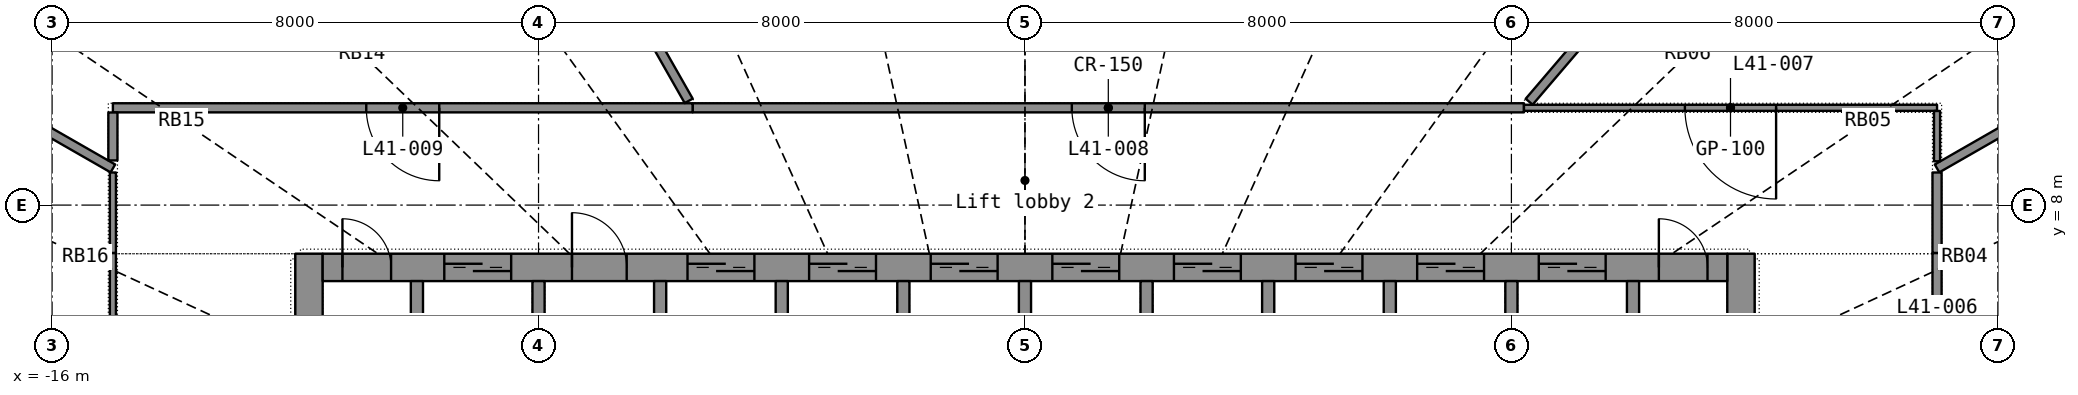
"""IFC4 building model, lengths in metres.
Left out: names, types, materials, properties, quantities, classifications, styles, units other than length and angle.
Written with IfcOpenShell. Run it as: python <this file> out.ifc"""

import sys

from ifc_helpers import new_model, si_unit, direction, frame, frame_2d, origin, place, context, subcontext, project, spatial, rectangle, extrude, element, fill, save


model = new_model("IFC4")
c1 = context("Model", 3, precision=1e-05, world=origin(), true_north=direction((0.0, 1.0)))
c2 = subcontext(c1, "Body", "Model", "MODEL_VIEW")
j1 = project(units=[si_unit("LENGTHUNIT", "METRE"), si_unit("PLANEANGLEUNIT", "RADIAN")], contexts=[c1])
p1 = place(None, origin())
s1 = spatial("IfcSite", under=j1, at=p1, CompositionType="ELEMENT")
p2 = place(p1, origin())
s2 = spatial("IfcBuilding", under=s1, at=p2, CompositionType="ELEMENT")
p3 = place(p2, frame((0.0, 0.0, 171.9)))
s3 = spatial("IfcBuildingStorey", under=s2, at=p3, CompositionType="ELEMENT", Elevation=171.9)
p4 = place(p3, frame((-11.775, -7.2, 0.0), z_axis=(0.0, 0.0, 1.0), x_axis=(0.0, 1.0, 0.0)))
e1 = element("IfcWall", 1, at=p4, inside=s3, PredefinedType="SHEAR", context=c2, shape_type="SweptSolid", body=[
    extrude(rectangle(XDim=14.4, YDim=0.45, at=frame_2d((7.2, 0.0))), origin(), (0.0, 0.0, 1.0), 3.3),
])
p5 = place(p4, frame((6.5, 0.0, 0.0)))
e2 = element("IfcOpeningElement", 2, at=p5, cuts=e1, PredefinedType="OPENING", context=c2, shape_type="SweptSolid", body=[
    extrude(rectangle(XDim=1.4, YDim=2.2, at=frame_2d((0.7, 1.1))), frame((0.0, 0.235, 0.0), z_axis=(0.0, -1.0, 0.0), x_axis=(1.0, 0.0, 0.0)), (0.0, 0.0, 1.0), 0.47),
])
p6 = place(p3, frame((11.775, -7.2, 0.0), z_axis=(0.0, 0.0, 1.0), x_axis=(0.0, 1.0, 0.0)))
e3 = element("IfcWall", 3, at=p6, inside=s3, PredefinedType="SHEAR", context=c2, shape_type="SweptSolid", body=[
    extrude(rectangle(XDim=14.4, YDim=0.45, at=frame_2d((7.2, 0.0))), origin(), (0.0, 0.0, 1.0), 3.3),
])
p7 = place(p6, frame((6.5, 0.0, 0.0)))
e4 = element("IfcOpeningElement", 4, at=p7, cuts=e3, PredefinedType="OPENING", context=c2, shape_type="SweptSolid", body=[
    extrude(rectangle(XDim=1.4, YDim=2.2, at=frame_2d((0.7, 1.1))), frame((0.0, 0.235, 0.0), z_axis=(0.0, -1.0, 0.0), x_axis=(1.0, 0.0, 0.0)), (0.0, 0.0, 1.0), 0.47),
])
p8 = place(p3, frame((-11.55, 6.975, 0.0), z_axis=(0.0, 0.0, 1.0), x_axis=(1.0, 0.0, 0.0)))
e5 = element("IfcWall", 5, at=p8, inside=s3, PredefinedType="SHEAR", context=c2, shape_type="SweptSolid", body=[
    extrude(rectangle(XDim=23.1, YDim=0.45, at=frame_2d((11.55, 0.0))), origin(), (0.0, 0.0, 1.0), 3.3),
])
p9 = place(p8, frame((2.0, 0.0, 0.0)))
e6 = element("IfcOpeningElement", 6, at=p9, cuts=e5, PredefinedType="OPENING", context=c2, shape_type="SweptSolid", body=[
    extrude(rectangle(XDim=1.1, YDim=2.2, at=frame_2d((0.55, 1.1))), frame((0.0, 0.235, 0.0), z_axis=(0.0, -1.0, 0.0), x_axis=(1.0, 0.0, 0.0)), (0.0, 0.0, 1.0), 0.47),
])
p10 = place(p8, frame((6.0, 0.0, 0.0)))
e7 = element("IfcOpeningElement", 7, at=p10, cuts=e5, PredefinedType="OPENING", context=c2, shape_type="SweptSolid", body=[
    extrude(rectangle(XDim=1.1, YDim=2.2, at=frame_2d((0.55, 1.1))), frame((0.0, 0.235, 0.0), z_axis=(0.0, -1.0, 0.0), x_axis=(1.0, 0.0, 0.0)), (0.0, 0.0, 1.0), 0.47),
])
p11 = place(p8, frame((8.0, 0.0, 0.0)))
e8 = element("IfcOpeningElement", 8, at=p11, cuts=e5, PredefinedType="OPENING", context=c2, shape_type="SweptSolid", body=[
    extrude(rectangle(XDim=1.1, YDim=2.2, at=frame_2d((0.55, 1.1))), frame((0.0, 0.235, 0.0), z_axis=(0.0, -1.0, 0.0), x_axis=(1.0, 0.0, 0.0)), (0.0, 0.0, 1.0), 0.47),
])
p12 = place(p8, frame((10.0, 0.0, 0.0)))
e9 = element("IfcOpeningElement", 9, at=p12, cuts=e5, PredefinedType="OPENING", context=c2, shape_type="SweptSolid", body=[
    extrude(rectangle(XDim=1.1, YDim=2.2, at=frame_2d((0.55, 1.1))), frame((0.0, 0.235, 0.0), z_axis=(0.0, -1.0, 0.0), x_axis=(1.0, 0.0, 0.0)), (0.0, 0.0, 1.0), 0.47),
])
p13 = place(p8, frame((12.0, 0.0, 0.0)))
e10 = element("IfcOpeningElement", 10, at=p13, cuts=e5, PredefinedType="OPENING", context=c2, shape_type="SweptSolid", body=[
    extrude(rectangle(XDim=1.1, YDim=2.2, at=frame_2d((0.55, 1.1))), frame((0.0, 0.235, 0.0), z_axis=(0.0, -1.0, 0.0), x_axis=(1.0, 0.0, 0.0)), (0.0, 0.0, 1.0), 0.47),
])
p14 = place(p8, frame((14.0, 0.0, 0.0)))
e11 = element("IfcOpeningElement", 11, at=p14, cuts=e5, PredefinedType="OPENING", context=c2, shape_type="SweptSolid", body=[
    extrude(rectangle(XDim=1.1, YDim=2.2, at=frame_2d((0.55, 1.1))), frame((0.0, 0.235, 0.0), z_axis=(0.0, -1.0, 0.0), x_axis=(1.0, 0.0, 0.0)), (0.0, 0.0, 1.0), 0.47),
])
p15 = place(p8, frame((16.0, 0.0, 0.0)))
e12 = element("IfcOpeningElement", 12, at=p15, cuts=e5, PredefinedType="OPENING", context=c2, shape_type="SweptSolid", body=[
    extrude(rectangle(XDim=1.1, YDim=2.2, at=frame_2d((0.55, 1.1))), frame((0.0, 0.235, 0.0), z_axis=(0.0, -1.0, 0.0), x_axis=(1.0, 0.0, 0.0)), (0.0, 0.0, 1.0), 0.47),
])
p16 = place(p8, frame((18.0, 0.0, 0.0)))
e13 = element("IfcOpeningElement", 13, at=p16, cuts=e5, PredefinedType="OPENING", context=c2, shape_type="SweptSolid", body=[
    extrude(rectangle(XDim=1.1, YDim=2.2, at=frame_2d((0.55, 1.1))), frame((0.0, 0.235, 0.0), z_axis=(0.0, -1.0, 0.0), x_axis=(1.0, 0.0, 0.0)), (0.0, 0.0, 1.0), 0.47),
])
p17 = place(p8, frame((20.0, 0.0, 0.0)))
e14 = element("IfcOpeningElement", 14, at=p17, cuts=e5, PredefinedType="OPENING", context=c2, shape_type="SweptSolid", body=[
    extrude(rectangle(XDim=1.1, YDim=2.2, at=frame_2d((0.55, 1.1))), frame((0.0, 0.235, 0.0), z_axis=(0.0, -1.0, 0.0), x_axis=(1.0, 0.0, 0.0)), (0.0, 0.0, 1.0), 0.47),
])
p18 = place(p8, frame((4.1, 0.0, 0.0)))
e15 = element("IfcOpeningElement", 15, at=p18, cuts=e5, PredefinedType="OPENING", context=c2, shape_type="SweptSolid", body=[
    extrude(rectangle(XDim=0.9, YDim=2.1, at=frame_2d((0.45, 1.05))), frame((0.0, 0.235, 0.0), z_axis=(0.0, -1.0, 0.0), x_axis=(1.0, 0.0, 0.0)), (0.0, 0.0, 1.0), 0.47),
])
p19 = place(p8, frame((0.325, 0.0, 0.0)))
e16 = element("IfcOpeningElement", 16, at=p19, cuts=e5, PredefinedType="OPENING", context=c2, shape_type="SweptSolid", body=[
    extrude(rectangle(XDim=0.8, YDim=2.05, at=frame_2d((0.4, 1.025))), frame((0.0, 0.235, 0.0), z_axis=(0.0, -1.0, 0.0), x_axis=(1.0, 0.0, 0.0)), (0.0, 0.0, 1.0), 0.47),
])
p20 = place(p8, frame((21.975, 0.0, 0.0)))
e17 = element("IfcOpeningElement", 17, at=p20, cuts=e5, PredefinedType="OPENING", context=c2, shape_type="SweptSolid", body=[
    extrude(rectangle(XDim=0.8, YDim=2.05, at=frame_2d((0.4, 1.025))), frame((0.0, 0.235, 0.0), z_axis=(0.0, -1.0, 0.0), x_axis=(1.0, 0.0, 0.0)), (0.0, 0.0, 1.0), 0.47),
])
for number, where, z_axis, x_axis in (
    (18, (-10.0, 3.9, 0.0), (0.0, 0.0, 1.0), (0.0, 1.0, 0.0)),
    (19, (-8.0, 3.9, 0.0), (0.0, 0.0, 1.0), (0.0, 1.0, 0.0)),
    (20, (-6.0, 3.9, 0.0), (0.0, 0.0, 1.0), (0.0, 1.0, 0.0)),
    (21, (-4.0, 3.9, 0.0), (0.0, 0.0, 1.0), (0.0, 1.0, 0.0)),
    (22, (-2.0, 3.9, 0.0), (0.0, 0.0, 1.0), (0.0, 1.0, 0.0)),
    (23, (0.0, 3.9, 0.0), (0.0, 0.0, 1.0), (0.0, 1.0, 0.0)),
    (24, (2.0, 3.9, 0.0), (0.0, 0.0, 1.0), (0.0, 1.0, 0.0)),
    (25, (4.0, 3.9, 0.0), (0.0, 0.0, 1.0), (0.0, 1.0, 0.0)),
    (26, (6.0, 3.9, 0.0), (0.0, 0.0, 1.0), (0.0, 1.0, 0.0)),
    (27, (8.0, 3.9, 0.0), (0.0, 0.0, 1.0), (0.0, 1.0, 0.0)),
    (28, (10.0, 3.9, 0.0), (0.0, 0.0, 1.0), (0.0, 1.0, 0.0)),
):
    element("IfcWall", number, at=place(p3, frame(where, z_axis=z_axis, x_axis=x_axis)), inside=s3, PredefinedType="SHEAR", context=c2, shape_type="SweptSolid", body=[
        extrude(rectangle(XDim=2.85, YDim=0.2, at=frame_2d((1.425, 0.0))), origin(), (0.0, 0.0, 1.0), 3.3),
    ])
p21 = place(p3, frame((8.206, 9.6, 0.0), z_axis=(0.0, 0.0, 1.0), x_axis=(-1.0, 0.0, 0.0)))
e29 = element("IfcWall", 29, at=p21, inside=s3, PredefinedType="PARTITIONING", context=c2, shape_type="SweptSolid", body=[
    extrude(rectangle(XDim=13.671, YDim=0.15, at=frame_2d((6.836, 0.0))), origin(), (0.0, 0.0, 1.0), 2.4),
])
p22 = place(p21, frame((6.236, 0.0, 0.0)))
e30 = element("IfcOpeningElement", 30, at=p22, cuts=e29, PredefinedType="OPENING", context=c2, shape_type="SweptSolid", body=[
    extrude(rectangle(XDim=1.2, YDim=2.2, at=frame_2d((0.6, 1.1))), frame((0.0, 0.085, 0.0), z_axis=(0.0, -1.0, 0.0), x_axis=(1.0, 0.0, 0.0)), (0.0, 0.0, 1.0), 0.17),
])
p23 = place(p3, frame((-5.466, 9.6, 0.0), z_axis=(0.0, 0.0, 1.0), x_axis=(-1.0, 0.0, 0.0)))
e31 = element("IfcWall", 31, at=p23, inside=s3, PredefinedType="PARTITIONING", context=c2, shape_type="SweptSolid", body=[
    extrude(rectangle(XDim=9.534, YDim=0.15, at=frame_2d((4.767, 0.0))), origin(), (0.0, 0.0, 1.0), 2.4),
])
p24 = place(p23, frame((4.167, 0.0, 0.0)))
e32 = element("IfcOpeningElement", 32, at=p24, cuts=e31, PredefinedType="OPENING", context=c2, shape_type="SweptSolid", body=[
    extrude(rectangle(XDim=1.2, YDim=2.2, at=frame_2d((0.6, 1.1))), frame((0.0, 0.085, 0.0), z_axis=(0.0, -1.0, 0.0), x_axis=(1.0, 0.0, 0.0)), (0.0, 0.0, 1.0), 0.17),
])
p25 = place(p3, frame((-9.883, 17.361, 0.0), z_axis=(0.0, 0.0, 1.0), x_axis=(0.494742876, -0.869039404, 0.0)))
e33 = element("IfcWall", 33, at=p25, inside=s3, PredefinedType="PARTITIONING", context=c2, shape_type="SweptSolid", body=[
    extrude(rectangle(XDim=8.799, YDim=0.15, at=frame_2d((4.399, 0.0))), origin(), (0.0, 0.0, 1.0), 2.4),
])
p26 = place(p3, frame((15.0, 9.6, 0.0), z_axis=(0.0, 0.0, 1.0), x_axis=(-1.0, 0.0, 0.0)))
e34 = element("IfcWall", 34, at=p26, inside=s3, PredefinedType="PARTITIONING", context=c2, shape_type="SweptSolid", body=[
    extrude(rectangle(XDim=6.794, YDim=0.1, at=frame_2d((3.397, 0.0))), origin(), (0.0, 0.0, 1.0), 2.4),
])
p27 = place(p26, frame((2.647, 0.0, 0.0)))
e35 = element("IfcOpeningElement", 35, at=p27, cuts=e34, PredefinedType="OPENING", context=c2, shape_type="SweptSolid", body=[
    extrude(rectangle(XDim=1.5, YDim=2.4, at=frame_2d((0.75, 1.2))), frame((0.0, 0.06, 0.0), z_axis=(0.0, -1.0, 0.0), x_axis=(1.0, 0.0, 0.0)), (0.0, 0.0, 1.0), 0.12),
])
p28 = place(p3, frame((12.13, 14.19, 0.0), z_axis=(0.0, 0.0, 1.0), x_axis=(-0.649796941, -0.760107845, 0.0)))
e36 = element("IfcWall", 36, at=p28, inside=s3, PredefinedType="PARTITIONING", context=c2, shape_type="SweptSolid", body=[
    extrude(rectangle(XDim=5.907, YDim=0.15, at=frame_2d((2.954, 0.0))), origin(), (0.0, 0.0, 1.0), 2.4),
])
p29 = place(p3, frame((-19.169, 10.994, 0.0), z_axis=(0.0, 0.0, 1.0), x_axis=(0.867457349, -0.497511556, 0.0)))
e37 = element("IfcWall", 37, at=p29, inside=s3, PredefinedType="PARTITIONING", context=c2, shape_type="SweptSolid", body=[
    extrude(rectangle(XDim=4.806, YDim=0.15, at=frame_2d((2.403, 0.0))), origin(), (0.0, 0.0, 1.0), 2.4),
])
p30 = place(p3, frame((19.167, 10.993, 0.0), z_axis=(0.0, 0.0, 1.0), x_axis=(-0.867466381, -0.497495807, 0.0)))
e38 = element("IfcWall", 38, at=p30, inside=s3, PredefinedType="PARTITIONING", context=c2, shape_type="SweptSolid", body=[
    extrude(rectangle(XDim=4.803, YDim=0.15, at=frame_2d((2.402, 0.0))), origin(), (0.0, 0.0, 1.0), 2.4),
])
p31 = place(p3, frame((-15.0, 7.212, 0.0), z_axis=(0.0, 0.0, 1.0), x_axis=(0.0, -1.0, 0.0)))
e39 = element("IfcWall", 39, at=p31, inside=s3, PredefinedType="PARTITIONING", context=c2, shape_type="SweptSolid", body=[
    extrude(rectangle(XDim=3.83, YDim=0.1, at=frame_2d((1.915, 0.0))), origin(), (0.0, 0.0, 1.0), 2.4),
])
p32 = place(p31, frame((1.165, 0.0, 0.0)))
e40 = element("IfcOpeningElement", 40, at=p32, cuts=e39, PredefinedType="OPENING", context=c2, shape_type="SweptSolid", body=[
    extrude(rectangle(XDim=1.5, YDim=2.4, at=frame_2d((0.75, 1.2))), frame((0.0, 0.06, 0.0), z_axis=(0.0, -1.0, 0.0), x_axis=(1.0, 0.0, 0.0)), (0.0, 0.0, 1.0), 0.12),
])
p33 = place(p3, frame((15.0, 3.387, 0.0), z_axis=(0.0, 0.0, 1.0), x_axis=(0.0, 1.0, 0.0)))
e41 = element("IfcWall", 41, at=p33, inside=s3, PredefinedType="PARTITIONING", context=c2, shape_type="SweptSolid", body=[
    extrude(rectangle(XDim=3.824, YDim=0.15, at=frame_2d((1.912, 0.0))), origin(), (0.0, 0.0, 1.0), 2.4),
])
p34 = place(p33, frame((1.437, 0.0, 0.0)))
e42 = element("IfcOpeningElement", 42, at=p34, cuts=e41, PredefinedType="OPENING", context=c2, shape_type="SweptSolid", body=[
    extrude(rectangle(XDim=0.95, YDim=2.15, at=frame_2d((0.475, 1.075))), frame((0.0, 0.085, 0.0), z_axis=(0.0, -1.0, 0.0), x_axis=(1.0, 0.0, 0.0)), (0.0, 0.0, 1.0), 0.17),
])
p35 = place(p3, frame((-15.0, 8.536, 0.0), z_axis=(0.0, 0.0, 1.0), x_axis=(0.0, -1.0, 0.0)))
e43 = element("IfcWall", 43, at=p35, inside=s3, PredefinedType="PARTITIONING", context=c2, shape_type="SweptSolid", body=[
    extrude(rectangle(XDim=1.323, YDim=0.1, at=frame_2d((0.662, 0.0))), origin(), (0.0, 0.0, 1.0), 2.4),
])
p36 = place(p3, frame((15.0, 7.213, 0.0), z_axis=(0.0, 0.0, 1.0), x_axis=(0.0, 1.0, 0.0)))
e44 = element("IfcWall", 44, at=p36, inside=s3, PredefinedType="PARTITIONING", context=c2, shape_type="SweptSolid", body=[
    extrude(rectangle(XDim=1.323, YDim=0.15, at=frame_2d((0.662, 0.0))), origin(), (0.0, 0.0, 1.0), 2.4),
])
p37 = place(p3, frame((-15.0, 9.523, 0.0), z_axis=(0.0, 0.0, 1.0), x_axis=(0.0, -1.0, 0.0)))
e45 = element("IfcWall", 45, at=p37, inside=s3, PredefinedType="PARTITIONING", context=c2, shape_type="SweptSolid", body=[
    extrude(rectangle(XDim=0.788, YDim=0.15, at=frame_2d((0.394, 0.0))), origin(), (0.0, 0.0, 1.0), 2.4),
])
p38 = place(p3, frame((15.0, 8.72, 0.0), z_axis=(0.0, 0.0, 1.0), x_axis=(0.0, 1.0, 0.0)))
e46 = element("IfcWall", 46, at=p38, inside=s3, PredefinedType="PARTITIONING", context=c2, shape_type="SweptSolid", body=[
    extrude(rectangle(XDim=0.828, YDim=0.1, at=frame_2d((0.414, 0.0))), origin(), (0.0, 0.0, 1.0), 2.4),
])
p39 = place(p9, origin())
e47 = element("IfcDoor", 47, at=p39, inside=s3, OperationType="DOUBLE_DOOR_SLIDING", PredefinedType="DOOR", context=c2, shape_type="SweptSolid", body=[
    extrude(rectangle(XDim=1.1, YDim=2.2, at=frame_2d((0.55, 1.1))), frame((0.0, 0.025, 0.0), z_axis=(0.0, -1.0, 0.0), x_axis=(1.0, 0.0, 0.0)), (0.0, 0.0, 1.0), 0.05),
])
fill(e6, e47)
p40 = place(p10, origin())
e48 = element("IfcDoor", 48, at=p40, inside=s3, OperationType="DOUBLE_DOOR_SLIDING", PredefinedType="DOOR", context=c2, shape_type="SweptSolid", body=[
    extrude(rectangle(XDim=1.1, YDim=2.2, at=frame_2d((0.55, 1.1))), frame((0.0, 0.025, 0.0), z_axis=(0.0, -1.0, 0.0), x_axis=(1.0, 0.0, 0.0)), (0.0, 0.0, 1.0), 0.05),
])
fill(e7, e48)
p41 = place(p11, origin())
e49 = element("IfcDoor", 49, at=p41, inside=s3, OperationType="DOUBLE_DOOR_SLIDING", PredefinedType="DOOR", context=c2, shape_type="SweptSolid", body=[
    extrude(rectangle(XDim=1.1, YDim=2.2, at=frame_2d((0.55, 1.1))), frame((0.0, 0.025, 0.0), z_axis=(0.0, -1.0, 0.0), x_axis=(1.0, 0.0, 0.0)), (0.0, 0.0, 1.0), 0.05),
])
fill(e8, e49)
p42 = place(p12, origin())
e50 = element("IfcDoor", 50, at=p42, inside=s3, OperationType="DOUBLE_DOOR_SLIDING", PredefinedType="DOOR", context=c2, shape_type="SweptSolid", body=[
    extrude(rectangle(XDim=1.1, YDim=2.2, at=frame_2d((0.55, 1.1))), frame((0.0, 0.025, 0.0), z_axis=(0.0, -1.0, 0.0), x_axis=(1.0, 0.0, 0.0)), (0.0, 0.0, 1.0), 0.05),
])
fill(e9, e50)
p43 = place(p13, origin())
e51 = element("IfcDoor", 51, at=p43, inside=s3, OperationType="DOUBLE_DOOR_SLIDING", PredefinedType="DOOR", context=c2, shape_type="SweptSolid", body=[
    extrude(rectangle(XDim=1.1, YDim=2.2, at=frame_2d((0.55, 1.1))), frame((0.0, 0.025, 0.0), z_axis=(0.0, -1.0, 0.0), x_axis=(1.0, 0.0, 0.0)), (0.0, 0.0, 1.0), 0.05),
])
fill(e10, e51)
p44 = place(p14, origin())
e52 = element("IfcDoor", 52, at=p44, inside=s3, OperationType="DOUBLE_DOOR_SLIDING", PredefinedType="DOOR", context=c2, shape_type="SweptSolid", body=[
    extrude(rectangle(XDim=1.1, YDim=2.2, at=frame_2d((0.55, 1.1))), frame((0.0, 0.025, 0.0), z_axis=(0.0, -1.0, 0.0), x_axis=(1.0, 0.0, 0.0)), (0.0, 0.0, 1.0), 0.05),
])
fill(e11, e52)
p45 = place(p15, origin())
e53 = element("IfcDoor", 53, at=p45, inside=s3, OperationType="DOUBLE_DOOR_SLIDING", PredefinedType="DOOR", context=c2, shape_type="SweptSolid", body=[
    extrude(rectangle(XDim=1.1, YDim=2.2, at=frame_2d((0.55, 1.1))), frame((0.0, 0.025, 0.0), z_axis=(0.0, -1.0, 0.0), x_axis=(1.0, 0.0, 0.0)), (0.0, 0.0, 1.0), 0.05),
])
fill(e12, e53)
p46 = place(p16, origin())
e54 = element("IfcDoor", 54, at=p46, inside=s3, OperationType="DOUBLE_DOOR_SLIDING", PredefinedType="DOOR", context=c2, shape_type="SweptSolid", body=[
    extrude(rectangle(XDim=1.1, YDim=2.2, at=frame_2d((0.55, 1.1))), frame((0.0, 0.025, 0.0), z_axis=(0.0, -1.0, 0.0), x_axis=(1.0, 0.0, 0.0)), (0.0, 0.0, 1.0), 0.05),
])
fill(e13, e54)
p47 = place(p17, origin())
e55 = element("IfcDoor", 55, at=p47, inside=s3, OperationType="DOUBLE_DOOR_SLIDING", PredefinedType="DOOR", context=c2, shape_type="SweptSolid", body=[
    extrude(rectangle(XDim=1.1, YDim=2.2, at=frame_2d((0.55, 1.1))), frame((0.0, 0.025, 0.0), z_axis=(0.0, -1.0, 0.0), x_axis=(1.0, 0.0, 0.0)), (0.0, 0.0, 1.0), 0.05),
])
fill(e14, e55)
p48 = place(p18, origin())
e56 = element("IfcDoor", 56, at=p48, inside=s3, OperationType="SINGLE_SWING_LEFT", PredefinedType="DOOR", context=c2, shape_type="SweptSolid", body=[
    extrude(rectangle(XDim=0.9, YDim=2.1, at=frame_2d((0.45, 1.05))), frame((0.0, 0.025, 0.0), z_axis=(0.0, -1.0, 0.0), x_axis=(1.0, 0.0, 0.0)), (0.0, 0.0, 1.0), 0.05),
])
fill(e15, e56)
p49 = place(p19, origin())
e57 = element("IfcDoor", 57, at=p49, inside=s3, OperationType="SINGLE_SWING_LEFT", PredefinedType="DOOR", context=c2, shape_type="SweptSolid", body=[
    extrude(rectangle(XDim=0.8, YDim=2.05, at=frame_2d((0.4, 1.025))), frame((0.0, 0.025, 0.0), z_axis=(0.0, -1.0, 0.0), x_axis=(1.0, 0.0, 0.0)), (0.0, 0.0, 1.0), 0.05),
])
fill(e16, e57)
p50 = place(p20, origin())
e58 = element("IfcDoor", 58, at=p50, inside=s3, OperationType="SINGLE_SWING_LEFT", PredefinedType="DOOR", context=c2, shape_type="SweptSolid", body=[
    extrude(rectangle(XDim=0.8, YDim=2.05, at=frame_2d((0.4, 1.025))), frame((0.0, 0.025, 0.0), z_axis=(0.0, -1.0, 0.0), x_axis=(1.0, 0.0, 0.0)), (0.0, 0.0, 1.0), 0.05),
])
fill(e17, e58)
p51 = place(p27, origin())
e59 = element("IfcDoor", 59, at=p51, inside=s3, OperationType="DOUBLE_DOOR_SINGLE_SWING", PredefinedType="DOOR", context=c2, shape_type="SweptSolid", body=[
    extrude(rectangle(XDim=1.5, YDim=2.4, at=frame_2d((0.75, 1.2))), frame((0.0, 0.025, 0.0), z_axis=(0.0, -1.0, 0.0), x_axis=(1.0, 0.0, 0.0)), (0.0, 0.0, 1.0), 0.05),
])
fill(e35, e59)
p52 = place(p22, origin())
e60 = element("IfcDoor", 60, at=p52, inside=s3, OperationType="DOUBLE_DOOR_SINGLE_SWING", PredefinedType="DOOR", context=c2, shape_type="SweptSolid", body=[
    extrude(rectangle(XDim=1.2, YDim=2.2, at=frame_2d((0.6, 1.1))), frame((0.0, 0.025, 0.0), z_axis=(0.0, -1.0, 0.0), x_axis=(1.0, 0.0, 0.0)), (0.0, 0.0, 1.0), 0.05),
])
fill(e30, e60)
p53 = place(p24, origin())
e61 = element("IfcDoor", 61, at=p53, inside=s3, OperationType="DOUBLE_DOOR_SINGLE_SWING", PredefinedType="DOOR", context=c2, shape_type="SweptSolid", body=[
    extrude(rectangle(XDim=1.2, YDim=2.2, at=frame_2d((0.6, 1.1))), frame((0.0, 0.025, 0.0), z_axis=(0.0, -1.0, 0.0), x_axis=(1.0, 0.0, 0.0)), (0.0, 0.0, 1.0), 0.05),
])
fill(e32, e61)
save(model, sys.argv[1])
